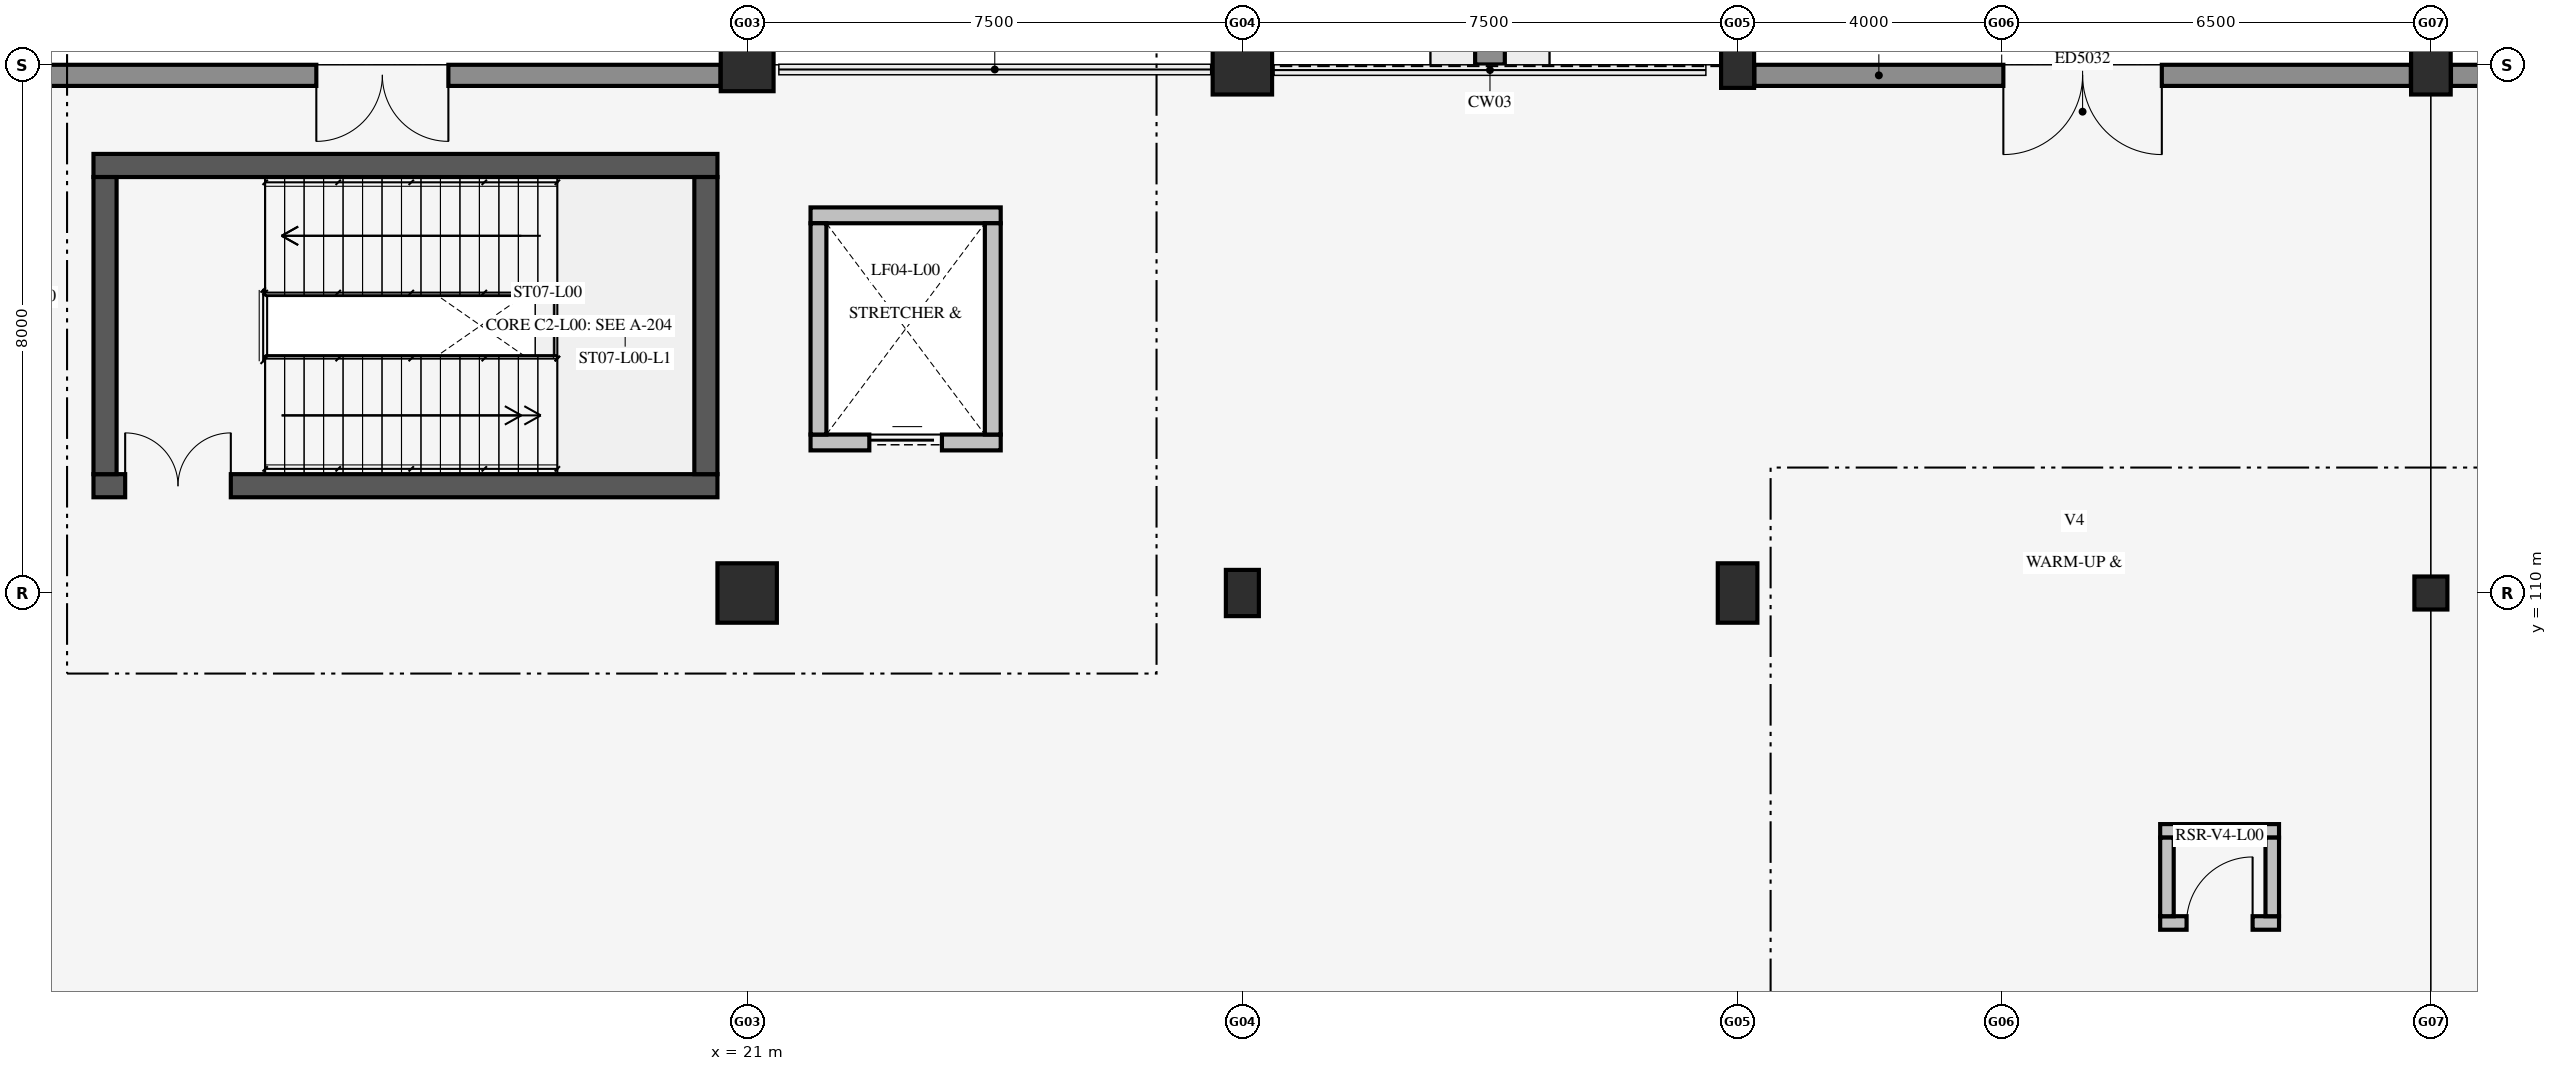
"""IFC4 building model, lengths in metres.
Left out: names, types, materials, properties, quantities, classifications, styles, units other than length and angle.
Written with IfcOpenShell. Run it as: python <this file> out.ifc"""

import sys

from ifc_helpers import new_model, si_unit, direction, frame, frame_2d, origin, origin_2d, place, context, subcontext, project, spatial, polyline, rectangle, circle, outline, extrude, element, fill, save


model = new_model("IFC4")
c1 = context("Model", 3, precision=1e-05, world=origin(), true_north=direction((0.0, 1.0)))
c2 = subcontext(c1, "Body", "Model", "MODEL_VIEW")
j1 = project(units=[si_unit("LENGTHUNIT", "METRE"), si_unit("PLANEANGLEUNIT", "RADIAN")], contexts=[c1])
p1 = place(None, origin())
s1 = spatial("IfcSite", under=j1, at=p1, CompositionType="ELEMENT")
p2 = place(p1, origin())
s2 = spatial("IfcBuilding", under=s1, at=p2, CompositionType="ELEMENT")
p3 = place(p2, origin())
s3 = spatial("IfcBuildingStorey", under=s2, at=p3, CompositionType="ELEMENT", Elevation=0.0)
p4 = place(p3, frame((11.1, 111.625, 0.0), z_axis=(0.0, 0.0, 1.0), x_axis=(1.0, 0.0, 0.0)))
e1 = element("IfcWall", 1, at=p4, inside=s3, PredefinedType="SHEAR", context=c2, shape_type="SweptSolid", body=[
    extrude(rectangle(XDim=9.45, YDim=0.35, at=frame_2d((4.725, 0.0))), origin(), (0.0, 0.0, 1.0), 5.16),
])
p5 = place(p4, frame((0.48, 0.0, 0.0)))
e2 = element("IfcOpeningElement", 2, at=p5, cuts=e1, PredefinedType="OPENING", context=c2, shape_type="SweptSolid", body=[
    extrude(rectangle(XDim=1.6, YDim=2.2, at=frame_2d((0.8, 1.1))), frame((0.0, 0.187, 0.0), z_axis=(0.0, -1.0, 0.0), x_axis=(1.0, 0.0, 0.0)), (0.0, 0.0, 1.0), 0.374),
])
p6 = place(p3, frame((11.1, 116.475, 0.0), z_axis=(0.0, 0.0, 1.0), x_axis=(1.0, 0.0, 0.0)))
e3 = element("IfcWall", 3, at=p6, inside=s3, PredefinedType="SHEAR", context=c2, shape_type="SweptSolid", body=[
    extrude(rectangle(XDim=9.45, YDim=0.35, at=frame_2d((4.725, 0.0))), origin(), (0.0, 0.0, 1.0), 5.16),
])
for number, where, z_axis, x_axis in (
    (4, (11.275, 111.8, 0.0), (0.0, 0.0, 1.0), (0.0, 1.0, 0.0)),
    (5, (20.375, 111.8, 0.0), (0.0, 0.0, 1.0), (0.0, 1.0, 0.0)),
):
    element("IfcWall", number, at=place(p3, frame(where, z_axis=z_axis, x_axis=x_axis)), inside=s3, PredefinedType="SHEAR", context=c2, shape_type="SweptSolid", body=[
        extrude(rectangle(XDim=4.5, YDim=0.35, at=frame_2d((2.25, 0.0))), origin(), (0.0, 0.0, 1.0), 5.16),
    ])
p7 = place(p3, frame((21.96, 112.28, 0.0), z_axis=(0.0, 0.0, 1.0), x_axis=(1.0, 0.0, 0.0)))
e6 = element("IfcWall", 6, at=p7, inside=s3, PredefinedType="SOLIDWALL", context=c2, shape_type="SweptSolid", body=[
    extrude(rectangle(XDim=2.88, YDim=0.24, at=frame_2d((1.44, 0.0))), origin(), (0.0, 0.0, 1.0), 5.4),
])
p8 = place(p7, frame((0.89, 0.0, 0.0)))
e7 = element("IfcOpeningElement", 7, at=p8, cuts=e6, PredefinedType="OPENING", context=c2, shape_type="SweptSolid", body=[
    extrude(rectangle(XDim=1.1, YDim=2.15, at=frame_2d((0.55, 1.075))), frame((0.0, 0.132, 0.0), z_axis=(0.0, -1.0, 0.0), x_axis=(1.0, 0.0, 0.0)), (0.0, 0.0, 1.0), 0.264),
])
p9 = place(p3, frame((21.96, 115.72, 0.0), z_axis=(0.0, 0.0, 1.0), x_axis=(1.0, 0.0, 0.0)))
e8 = element("IfcWall", 8, at=p9, inside=s3, PredefinedType="SOLIDWALL", context=c2, shape_type="SweptSolid", body=[
    extrude(rectangle(XDim=2.88, YDim=0.24, at=frame_2d((1.44, 0.0))), origin(), (0.0, 0.0, 1.0), 5.4),
])
for number, where, z_axis, x_axis in (
    (9, (22.08, 112.4, 0.0), (0.0, 0.0, 1.0), (0.0, 1.0, 0.0)),
    (10, (24.72, 112.4, 0.0), (0.0, 0.0, 1.0), (0.0, 1.0, 0.0)),
):
    element("IfcWall", number, at=place(p3, frame(where, z_axis=z_axis, x_axis=x_axis)), inside=s3, PredefinedType="SOLIDWALL", context=c2, shape_type="SweptSolid", body=[
        extrude(rectangle(XDim=3.2, YDim=0.24, at=frame_2d((1.6, 0.0))), origin(), (0.0, 0.0, 1.0), 5.4),
    ])
p10 = place(p3, frame((21.0, 110.0, 0.0), z_axis=(0.0, 0.0, 1.0), x_axis=(1.0, 0.0, 0.0)))
e11 = element("IfcColumn", 11, at=p10, inside=s3, PredefinedType="COLUMN", context=c2, shape_type="SweptSolid", body=[
    extrude(rectangle(XDim=0.9, YDim=0.9, at=origin_2d()), origin(), (0.0, 0.0, 1.0), 5.4),
])
p11 = place(p3, frame((21.0, 118.0, 0.0), z_axis=(0.0, 0.0, 1.0), x_axis=(1.0, 0.0, 0.0)))
e12 = element("IfcColumn", 12, at=p11, inside=s3, PredefinedType="COLUMN", context=c2, shape_type="SweptSolid", body=[
    extrude(rectangle(XDim=0.8, YDim=0.8, at=origin_2d()), origin(), (0.0, 0.0, 1.0), 5.4),
])
p12 = place(p3, frame((28.5, 110.0, 0.0), z_axis=(0.0, 0.0, 1.0), x_axis=(1.0, 0.0, 0.0)))
e13 = element("IfcColumn", 13, at=p12, inside=s3, PredefinedType="COLUMN", context=c2, shape_type="SweptSolid", body=[
    extrude(rectangle(XDim=0.5, YDim=0.7, at=origin_2d()), origin(), (0.0, 0.0, 1.0), 5.4),
])
p13 = place(p3, frame((28.5, 118.0, 0.0), z_axis=(0.0, 0.0, 1.0), x_axis=(1.0, 0.0, 0.0)))
e14 = element("IfcColumn", 14, at=p13, inside=s3, PredefinedType="COLUMN", context=c2, shape_type="SweptSolid", body=[
    extrude(rectangle(XDim=0.9, YDim=0.9, at=origin_2d()), origin(), (0.0, 0.0, 1.0), 5.4),
])
p14 = place(p3, frame((36.0, 110.0, 0.0), z_axis=(0.0, 0.0, 1.0), x_axis=(1.0, 0.0, 0.0)))
e15 = element("IfcColumn", 15, at=p14, inside=s3, PredefinedType="COLUMN", context=c2, shape_type="SweptSolid", body=[
    extrude(rectangle(XDim=0.6, YDim=0.9, at=origin_2d()), origin(), (0.0, 0.0, 1.0), 5.4),
])
p15 = place(p3, frame((36.0, 118.0, 0.0), z_axis=(0.0, 0.0, 1.0), x_axis=(1.0, 0.0, 0.0)))
e16 = element("IfcColumn", 16, at=p15, inside=s3, PredefinedType="COLUMN", context=c2, shape_type="SweptSolid", body=[
    extrude(rectangle(XDim=0.5, YDim=0.7, at=origin_2d()), origin(), (0.0, 0.0, 1.0), 5.4),
])
p16 = place(p3, frame((46.5, 110.0, 0.0), z_axis=(0.0, 0.0, 1.0), x_axis=(1.0, 0.0, 0.0)))
e17 = element("IfcColumn", 17, at=p16, inside=s3, PredefinedType="COLUMN", context=c2, shape_type="SweptSolid", body=[
    extrude(circle(Radius=0.25, at=origin_2d()), origin(), (0.0, 0.0, 1.0), 5.4),
])
p17 = place(p3, frame((46.5, 118.0, 0.0), z_axis=(0.0, 0.0, 1.0), x_axis=(1.0, 0.0, 0.0)))
e18 = element("IfcColumn", 18, at=p17, inside=s3, PredefinedType="COLUMN", context=c2, shape_type="SweptSolid", body=[
    extrude(rectangle(XDim=0.6, YDim=0.9, at=origin_2d()), origin(), (0.0, 0.0, 1.0), 5.4),
])
p18 = place(p3, frame((42.4, 105.002, 0.0), z_axis=(0.0, 0.0, 1.0), x_axis=(1.0, 0.0, 0.0)))
e19 = element("IfcWall", 19, at=p18, inside=s3, PredefinedType="SOLIDWALL", context=c2, shape_type="SweptSolid", body=[
    extrude(rectangle(XDim=1.8, YDim=0.205, at=frame_2d((0.9, 0.0))), origin(), (0.0, 0.0, 1.0), 5.145),
])
p19 = place(p18, frame((0.4, 0.0, 0.0)))
e20 = element("IfcOpeningElement", 20, at=p19, cuts=e19, PredefinedType="OPENING", context=c2, shape_type="SweptSolid", body=[
    extrude(rectangle(XDim=1.0, YDim=2.2, at=frame_2d((0.5, 1.1))), frame((0.0, 0.115, 0.0), z_axis=(0.0, -1.0, 0.0), x_axis=(1.0, 0.0, 0.0)), (0.0, 0.0, 1.0), 0.229),
])
p20 = place(p3, frame((42.4, 106.397, 0.0), z_axis=(0.0, 0.0, 1.0), x_axis=(1.0, 0.0, 0.0)))
e21 = element("IfcWall", 21, at=p20, inside=s3, PredefinedType="SOLIDWALL", context=c2, shape_type="SweptSolid", body=[
    extrude(rectangle(XDim=1.8, YDim=0.205, at=frame_2d((0.9, 0.0))), origin(), (0.0, 0.0, 1.0), 5.145),
])
for number, where, z_axis, x_axis in (
    (22, (44.097, 105.105, 0.0), (0.0, 0.0, 1.0), (0.0, 1.0, 0.0)),
    (23, (42.502, 105.105, 0.0), (0.0, 0.0, 1.0), (0.0, 1.0, 0.0)),
):
    element("IfcWall", number, at=place(p3, frame(where, z_axis=z_axis, x_axis=x_axis)), inside=s3, PredefinedType="SOLIDWALL", context=c2, shape_type="SweptSolid", body=[
        extrude(rectangle(XDim=1.19, YDim=0.205, at=frame_2d((0.595, 0.0))), origin(), (0.0, 0.0, 1.0), 5.145),
    ])
p21 = place(p3, frame((10.354, 117.84, 0.0), z_axis=(0.0, 0.0, 1.0), x_axis=(1.0, 0.0, 0.0)))
e24 = element("IfcWall", 24, at=p21, inside=s3, PredefinedType="SOLIDWALL", context=c2, shape_type="SweptSolid", body=[
    extrude(rectangle(XDim=10.242, YDim=0.32, at=frame_2d((5.121, 0.0))), origin(), (0.0, 0.0, 1.0), 4.67),
])
p22 = place(p21, frame((4.121, 0.0, 0.0)))
e25 = element("IfcOpeningElement", 25, at=p22, cuts=e24, PredefinedType="OPENING", context=c2, shape_type="SweptSolid", body=[
    extrude(rectangle(XDim=2.0, YDim=2.4, at=frame_2d((1.0, 1.2))), frame((0.0, 0.172, 0.0), z_axis=(0.0, -1.0, 0.0), x_axis=(1.0, 0.0, 0.0)), (0.0, 0.0, 1.0), 0.344),
])
p23 = place(p3, frame((36.254, 117.84, 0.0), z_axis=(0.0, 0.0, 1.0), x_axis=(1.0, 0.0, 0.0)))
e26 = element("IfcWall", 26, at=p23, inside=s3, PredefinedType="SOLIDWALL", context=c2, shape_type="SweptSolid", body=[
    extrude(rectangle(XDim=9.942, YDim=0.32, at=frame_2d((4.971, 0.0))), origin(), (0.0, 0.0, 1.0), 4.717),
])
p24 = place(p23, frame((3.771, 0.0, 0.0)))
e27 = element("IfcOpeningElement", 27, at=p24, cuts=e26, PredefinedType="OPENING", context=c2, shape_type="SweptSolid", body=[
    extrude(rectangle(XDim=2.4, YDim=2.6, at=frame_2d((1.2, 1.3))), frame((0.0, 0.172, 0.0), z_axis=(0.0, -1.0, 0.0), x_axis=(1.0, 0.0, 0.0)), (0.0, 0.0, 1.0), 0.344),
])
p25 = place(p3, frame((46.804, 117.84, 0.0), z_axis=(0.0, 0.0, 1.0), x_axis=(1.0, 0.0, 0.0)))
e28 = element("IfcWall", 28, at=p25, inside=s3, PredefinedType="SOLIDWALL", context=c2, shape_type="SweptSolid", body=[
    extrude(rectangle(XDim=5.942, YDim=0.32, at=frame_2d((2.971, 0.0))), origin(), (0.0, 0.0, 1.0), 4.67),
])
p26 = place(p25, frame((1.921, 0.0, 0.0)))
e29 = element("IfcOpeningElement", 29, at=p26, cuts=e28, PredefinedType="OPENING", context=c2, shape_type="SweptSolid", body=[
    extrude(rectangle(XDim=2.1, YDim=2.5, at=frame_2d((1.05, 1.25))), frame((0.0, 0.172, 0.0), z_axis=(0.0, -1.0, 0.0), x_axis=(1.0, 0.0, 0.0)), (0.0, 0.0, 1.0), 0.344),
])
p27 = place(p3, frame((32.25, 127.92, -0.7), z_axis=(0.0, 0.0, 1.0), x_axis=(0.0, -1.0, 0.0)))
e30 = element("IfcWall", 30, at=p27, inside=s3, PredefinedType="USERDEFINED", context=c2, shape_type="SweptSolid", body=[
    extrude(outline(polyline([(0.0, 0.0), (9.915, 0.0), (9.915, 0.483), (0.0, 0.026), (0.0, 0.0)])), frame((0.0, 0.225, 0.0), z_axis=(0.0, -1.0, 0.0), x_axis=(1.0, 0.0, 0.0)), (0.0, 0.0, 1.0), 0.45),
])
p28 = place(p5, frame((1.6, 0.0, 0.0), z_axis=(0.0, 0.0, 1.0), x_axis=(-1.0, 0.0, 0.0)))
e31 = element("IfcDoor", 31, at=p28, inside=s3, OperationType="DOUBLE_DOOR_SINGLE_SWING", PredefinedType="DOOR", context=c2, shape_type="SweptSolid", body=[
    extrude(rectangle(XDim=1.6, YDim=2.2, at=frame_2d((0.8, 1.1))), frame((0.0, 0.025, 0.0), z_axis=(0.0, -1.0, 0.0), x_axis=(1.0, 0.0, 0.0)), (0.0, 0.0, 1.0), 0.05),
])
fill(e2, e31)
p29 = place(p19, origin())
e32 = element("IfcDoor", 32, at=p29, inside=s3, OperationType="SINGLE_SWING_RIGHT", PredefinedType="DOOR", context=c2, shape_type="SweptSolid", body=[
    extrude(rectangle(XDim=1.0, YDim=2.2, at=frame_2d((0.5, 1.1))), frame((0.0, 0.025, 0.0), z_axis=(0.0, -1.0, 0.0), x_axis=(1.0, 0.0, 0.0)), (0.0, 0.0, 1.0), 0.05),
])
fill(e20, e32)
p30 = place(p22, origin())
e33 = element("IfcDoor", 33, at=p30, inside=s3, OperationType="DOUBLE_DOOR_SINGLE_SWING", PredefinedType="DOOR", context=c2, shape_type="SweptSolid", body=[
    extrude(rectangle(XDim=2.0, YDim=2.4, at=frame_2d((1.0, 1.2))), frame((0.0, 0.025, 0.0), z_axis=(0.0, -1.0, 0.0), x_axis=(1.0, 0.0, 0.0)), (0.0, 0.0, 1.0), 0.05),
])
fill(e25, e33)
p31 = place(p24, origin())
e34 = element("IfcDoor", 34, at=p31, inside=s3, OperationType="DOUBLE_DOOR_SINGLE_SWING", PredefinedType="DOOR", context=c2, shape_type="SweptSolid", body=[
    extrude(rectangle(XDim=2.4, YDim=2.6, at=frame_2d((1.2, 1.3))), frame((0.0, 0.025, 0.0), z_axis=(0.0, -1.0, 0.0), x_axis=(1.0, 0.0, 0.0)), (0.0, 0.0, 1.0), 0.05),
])
fill(e27, e34)
p32 = place(p8, origin())
e35 = element("IfcDoor", 35, at=p32, inside=s3, OperationType="SLIDING_TO_RIGHT", PredefinedType="USERDEFINED", context=c2, shape_type="SweptSolid", body=[
    extrude(rectangle(XDim=1.1, YDim=2.15, at=frame_2d((0.55, 1.075))), frame((0.0, 0.025, 0.0), z_axis=(0.0, -1.0, 0.0), x_axis=(1.0, 0.0, 0.0)), (0.0, 0.0, 1.0), 0.05),
])
fill(e7, e35)
save(model, sys.argv[1])
